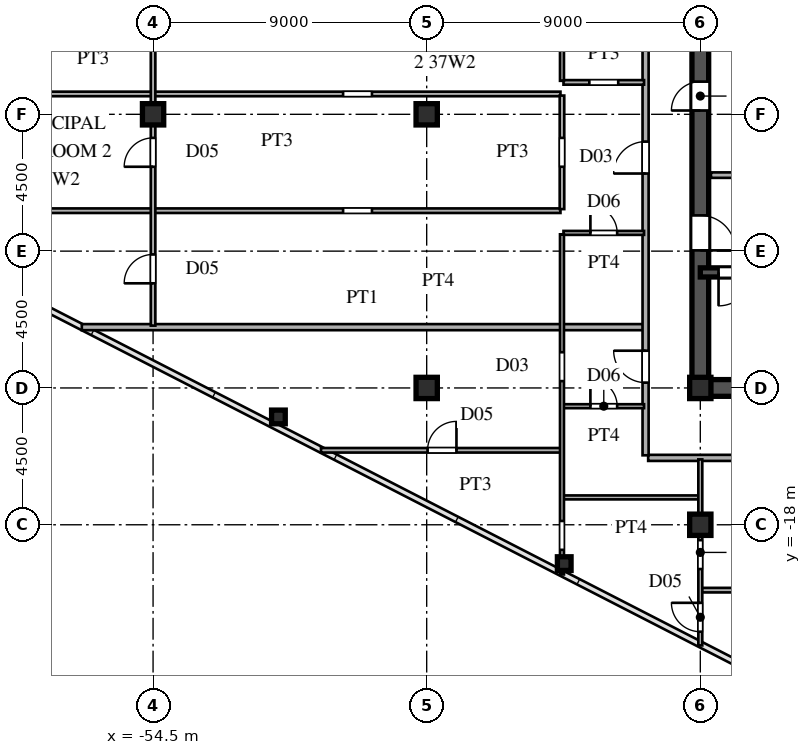
"""IFC4 building model, lengths in metres.
Left out: names, types, materials, properties, quantities, classifications, styles, units other than length and angle.
Written with IfcOpenShell. Run it as: python <this file> out.ifc"""

import sys

from ifc_helpers import new_model, si_unit, direction, frame, frame_2d, origin, origin_2d, place, context, subcontext, project, spatial, rectangle, hollow_rectangle, i_section, extrude, source, transform, mapped, element, fill, save


model = new_model("IFC4")
c1 = context("Model", 3, precision=1e-05, world=origin(), true_north=direction((0.0, 1.0)))
c2 = subcontext(c1, "Body", "Model", "MODEL_VIEW")
j1 = project(units=[si_unit("LENGTHUNIT", "METRE"), si_unit("PLANEANGLEUNIT", "RADIAN")], contexts=[c1])
p1 = place(None, origin())
s1 = spatial("IfcSite", under=j1, at=p1, CompositionType="ELEMENT")
p2 = place(p1, origin())
s2 = spatial("IfcBuilding", under=s1, at=p2, CompositionType="ELEMENT")
p3 = place(p2, frame((0.0, 0.0, 140.4)))
s3 = spatial("IfcBuildingStorey", under=s2, at=p3, CompositionType="ELEMENT", Elevation=140.4)
m1 = source(origin(), c2, "Body", "SweptSolid", [
    extrude(i_section(OverallWidth=0.7, OverallDepth=0.7, WebThickness=0.028, FlangeThickness=0.045, at=origin_2d()), origin(), (0.0, 0.0, 1.0), 3.6),
])
for number, where, z_axis, x_axis in (
    (1, (-36.5, -18.0, 0.0), (0.0, 0.0, 1.0), (1.0, 0.0, 0.0)),
    (2, (-36.5, -13.5, 0.0), (0.0, 0.0, 1.0), (1.0, 0.0, 0.0)),
    (3, (-45.5, -13.5, 0.0), (0.0, 0.0, 1.0), (1.0, 0.0, 0.0)),
    (4, (-45.5, -4.5, 0.0), (0.0, 0.0, 1.0), (1.0, 0.0, 0.0)),
    (5, (-54.5, -4.5, 0.0), (0.0, 0.0, 1.0), (1.0, 0.0, 0.0)),
):
    element("IfcColumn", number, at=place(p3, frame(where, z_axis=z_axis, x_axis=x_axis)), inside=s3, PredefinedType="COLUMN", context=c2, shape_type="MappedRepresentation", body=[
        mapped(m1, transform((0.0, 0.0, 0.0), scale=1.0)),
    ])
m2 = source(origin(), c2, "Body", "SweptSolid", [
    extrude(hollow_rectangle(XDim=0.45, YDim=0.45, WallThickness=0.018, at=origin_2d()), origin(), (0.0, 0.0, 1.0), 3.6),
])
for number, where, z_axis, x_axis in (
    (6, (-40.976, -19.278, 0.0), (0.0, 0.0, 1.0), (1.0, 0.0, 0.0)),
    (7, (-50.377, -14.453, 0.0), (0.0, 0.0, 1.0), (1.0, 0.0, 0.0)),
):
    element("IfcColumn", number, at=place(p3, frame(where, z_axis=z_axis, x_axis=x_axis)), inside=s3, PredefinedType="COLUMN", context=c2, shape_type="MappedRepresentation", body=[
        mapped(m2, transform((0.0, 0.0, 0.0), scale=1.0)),
    ])
p4 = place(p3, frame((-36.5, -13.5, 0.0), z_axis=(0.0, 0.0, 1.0), x_axis=(1.0, 0.0, 0.0)))
e8 = element("IfcWall", 8, at=p4, inside=s3, PredefinedType="SHEAR", context=c2, shape_type="SweptSolid", body=[
    extrude(rectangle(XDim=9.0, YDim=0.55, at=frame_2d((4.5, 0.0))), origin(), (0.0, 0.0, 1.0), 3.38),
])
p5 = place(p3, frame((-36.5, -13.65, 0.0), z_axis=(0.0, 0.0, 1.0), x_axis=(0.0, 1.0, 0.0)))
e9 = element("IfcWall", 9, at=p5, inside=s3, PredefinedType="SHEAR", context=c2, shape_type="SweptSolid", body=[
    extrude(rectangle(XDim=7.15, YDim=0.55, at=frame_2d((3.575, 0.0))), origin(), (0.0, 0.0, 1.0), 3.38),
])
p6 = place(p5, frame((4.675, 0.0, 0.0)))
e10 = element("IfcOpeningElement", 10, at=p6, cuts=e9, PredefinedType="OPENING", context=c2, shape_type="SweptSolid", body=[
    extrude(rectangle(XDim=1.15, YDim=2.2, at=frame_2d((0.575, 1.1))), frame((0.0, 0.285, 0.0), z_axis=(0.0, -1.0, 0.0), x_axis=(1.0, 0.0, 0.0)), (0.0, 0.0, 1.0), 0.57),
])
p7 = place(p3, frame((-36.5, -6.5, 0.0), z_axis=(0.0, 0.0, 1.0), x_axis=(0.0, 1.0, 0.0)))
e11 = element("IfcWall", 11, at=p7, inside=s3, PredefinedType="SHEAR", context=c2, shape_type="SweptSolid", body=[
    extrude(rectangle(XDim=5.2, YDim=0.55, at=frame_2d((2.6, 0.0))), origin(), (0.0, 0.0, 1.0), 3.38),
])
p8 = place(p7, frame((2.125, 0.0, 0.0)))
e12 = element("IfcOpeningElement", 12, at=p8, cuts=e11, PredefinedType="OPENING", context=c2, shape_type="SweptSolid", body=[
    extrude(rectangle(XDim=0.95, YDim=2.15, at=frame_2d((0.475, 1.075))), frame((0.0, 0.285, 0.0), z_axis=(0.0, -1.0, 0.0), x_axis=(1.0, 0.0, 0.0)), (0.0, 0.0, 1.0), 0.57),
])
p9 = place(p3, frame((-36.5, -9.7, 0.0), z_axis=(0.0, 0.0, 1.0), x_axis=(1.0, 0.0, 0.0)))
e13 = element("IfcWall", 13, at=p9, inside=s3, PredefinedType="SHEAR", context=c2, shape_type="SweptSolid", body=[
    extrude(rectangle(XDim=9.0, YDim=0.3, at=frame_2d((4.5, 0.0))), origin(), (0.0, 0.0, 1.0), 3.38),
])
p10 = place(p9, frame((0.6, 0.0, 0.0)))
e14 = element("IfcOpeningElement", 14, at=p10, cuts=e13, PredefinedType="OPENING", context=c2, shape_type="SweptSolid", body=[
    extrude(rectangle(XDim=1.1, YDim=2.2, at=frame_2d((0.55, 1.1))), frame((0.0, 0.16, 0.0), z_axis=(0.0, -1.0, 0.0), x_axis=(1.0, 0.0, 0.0)), (0.0, 0.0, 1.0), 0.32),
])
p11 = place(p3, frame((-36.15, -6.5, 0.0), z_axis=(0.0, 0.0, 1.0), x_axis=(1.0, 0.0, 0.0)))
e15 = element("IfcWall", 15, at=p11, inside=s3, PredefinedType="PARTITIONING", context=c2, shape_type="SweptSolid", body=[
    extrude(rectangle(XDim=5.7, YDim=0.18, at=frame_2d((2.85, 0.0))), origin(), (0.0, 0.0, 1.0), 3.38),
])
p12 = place(p3, frame((-36.45, -20.15, 0.0), z_axis=(0.0, 0.0, 1.0), x_axis=(1.0, 0.0, 0.0)))
e16 = element("IfcWall", 16, at=p12, inside=s3, PredefinedType="PARTITIONING", context=c2, shape_type="SweptSolid", body=[
    extrude(rectangle(XDim=8.649, YDim=0.15, at=frame_2d((4.325, 0.0))), origin(), (0.0, 0.0, 1.0), 3.38),
])
p13 = place(p3, frame((-41.0, -17.1, 0.0), z_axis=(0.0, 0.0, 1.0), x_axis=(1.0, 0.0, 0.0)))
e17 = element("IfcWall", 17, at=p13, inside=s3, PredefinedType="PARTITIONING", context=c2, shape_type="SweptSolid", body=[
    extrude(rectangle(XDim=4.45, YDim=0.13, at=frame_2d((2.225, 0.0))), origin(), (0.0, 0.0, 1.0), 3.38),
])
p14 = place(p3, frame((-38.215, -15.8, 0.0), z_axis=(0.0, 0.0, 1.0), x_axis=(1.0, 0.0, 0.0)))
e18 = element("IfcWall", 18, at=p14, inside=s3, PredefinedType="PARTITIONING", context=c2, shape_type="SweptSolid", body=[
    extrude(rectangle(XDim=10.715, YDim=0.2, at=frame_2d((5.357, 0.0))), origin(), (0.0, 0.0, 1.0), 3.38),
])
p15 = place(p3, frame((-48.977, -15.55, 0.0), z_axis=(0.0, 0.0, 1.0), x_axis=(1.0, 0.0, 0.0)))
e19 = element("IfcWall", 19, at=p15, inside=s3, PredefinedType="PARTITIONING", context=c2, shape_type="SweptSolid", body=[
    extrude(rectangle(XDim=7.877, YDim=0.15, at=frame_2d((3.938, 0.0))), origin(), (0.0, 0.0, 1.0), 3.38),
])
p16 = place(p15, frame((3.506, 0.0, 0.0)))
e20 = element("IfcOpeningElement", 20, at=p16, cuts=e19, PredefinedType="OPENING", context=c2, shape_type="SweptSolid", body=[
    extrude(rectangle(XDim=0.95, YDim=2.15, at=frame_2d((0.475, 1.075))), frame((0.0, 0.085, 0.0), z_axis=(0.0, -1.0, 0.0), x_axis=(1.0, 0.0, 0.0)), (0.0, 0.0, 1.0), 0.17),
])
p17 = place(p3, frame((-41.0, -14.1, 0.0), z_axis=(0.0, 0.0, 1.0), x_axis=(1.0, 0.0, 0.0)))
e21 = element("IfcWall", 21, at=p17, inside=s3, PredefinedType="PARTITIONING", context=c2, shape_type="SweptSolid", body=[
    extrude(rectangle(XDim=2.65, YDim=0.13, at=frame_2d((1.325, 0.0))), origin(), (0.0, 0.0, 1.0), 3.38),
])
p18 = place(p17, frame((0.885, 0.0, 0.0)))
e22 = element("IfcOpeningElement", 22, at=p18, cuts=e21, PredefinedType="OPENING", context=c2, shape_type="SweptSolid", body=[
    extrude(rectangle(XDim=0.88, YDim=2.1, at=frame_2d((0.44, 1.05))), frame((0.0, 0.075, 0.0), z_axis=(0.0, -1.0, 0.0), x_axis=(1.0, 0.0, 0.0)), (0.0, 0.0, 1.0), 0.15),
])
p19 = place(p3, frame((-56.844, -11.5, 0.0), z_axis=(0.0, 0.0, 1.0), x_axis=(1.0, 0.0, 0.0)))
e23 = element("IfcWall", 23, at=p19, inside=s3, PredefinedType="PARTITIONING", context=c2, shape_type="SweptSolid", body=[
    extrude(rectangle(XDim=18.464, YDim=0.2, at=frame_2d((9.232, 0.0))), origin(), (0.0, 0.0, 1.0), 3.38),
])
p20 = place(p3, frame((-41.0, -8.4, 0.0), z_axis=(0.0, 0.0, 1.0), x_axis=(1.0, 0.0, 0.0)))
e24 = element("IfcWall", 24, at=p20, inside=s3, PredefinedType="PARTITIONING", context=c2, shape_type="SweptSolid", body=[
    extrude(rectangle(XDim=2.65, YDim=0.13, at=frame_2d((1.325, 0.0))), origin(), (0.0, 0.0, 1.0), 3.38),
])
p21 = place(p20, frame((0.885, 0.0, 0.0)))
e25 = element("IfcOpeningElement", 25, at=p21, cuts=e24, PredefinedType="OPENING", context=c2, shape_type="SweptSolid", body=[
    extrude(rectangle(XDim=0.88, YDim=2.1, at=frame_2d((0.44, 1.05))), frame((0.0, 0.075, 0.0), z_axis=(0.0, -1.0, 0.0), x_axis=(1.0, 0.0, 0.0)), (0.0, 0.0, 1.0), 0.15),
])
p22 = place(p3, frame((-64.338, -7.67, 0.0), z_axis=(0.0, 0.0, 1.0), x_axis=(1.0, 0.0, 0.0)))
e26 = element("IfcWall", 26, at=p22, inside=s3, PredefinedType="PARTITIONING", context=c2, shape_type="SweptSolid", body=[
    extrude(rectangle(XDim=23.238, YDim=0.15, at=frame_2d((11.619, 0.0))), origin(), (0.0, 0.0, 1.0), 3.38),
])
p23 = place(p22, frame((16.088, 0.0, 0.0)))
e27 = element("IfcOpeningElement", 27, at=p23, cuts=e26, PredefinedType="OPENING", context=c2, shape_type="SweptSolid", body=[
    extrude(rectangle(XDim=0.95, YDim=2.15, at=frame_2d((0.475, 1.075))), frame((0.0, 0.085, 0.0), z_axis=(0.0, -1.0, 0.0), x_axis=(1.0, 0.0, 0.0)), (0.0, 0.0, 1.0), 0.17),
])
p24 = place(p3, frame((-69.535, -3.83, 0.0), z_axis=(0.0, 0.0, 1.0), x_axis=(1.0, 0.0, 0.0)))
e28 = element("IfcWall", 28, at=p24, inside=s3, PredefinedType="PARTITIONING", context=c2, shape_type="SweptSolid", body=[
    extrude(rectangle(XDim=28.435, YDim=0.15, at=frame_2d((14.217, 0.0))), origin(), (0.0, 0.0, 1.0), 3.38),
])
p25 = place(p24, frame((21.285, 0.0, 0.0)))
e29 = element("IfcOpeningElement", 29, at=p25, cuts=e28, PredefinedType="OPENING", context=c2, shape_type="SweptSolid", body=[
    extrude(rectangle(XDim=0.95, YDim=2.15, at=frame_2d((0.475, 1.075))), frame((0.0, 0.085, 0.0), z_axis=(0.0, -1.0, 0.0), x_axis=(1.0, 0.0, 0.0)), (0.0, 0.0, 1.0), 0.17),
])
p26 = place(p3, frame((-41.0, -3.45, 0.0), z_axis=(0.0, 0.0, 1.0), x_axis=(1.0, 0.0, 0.0)))
e30 = element("IfcWall", 30, at=p26, inside=s3, PredefinedType="PARTITIONING", context=c2, shape_type="SweptSolid", body=[
    extrude(rectangle(XDim=2.65, YDim=0.15, at=frame_2d((1.325, 0.0))), origin(), (0.0, 0.0, 1.0), 3.38),
])
p27 = place(p26, frame((0.85, 0.0, 0.0)))
e31 = element("IfcOpeningElement", 31, at=p27, cuts=e30, PredefinedType="OPENING", context=c2, shape_type="SweptSolid", body=[
    extrude(rectangle(XDim=0.95, YDim=2.15, at=frame_2d((0.475, 1.075))), frame((0.0, 0.085, 0.0), z_axis=(0.0, -1.0, 0.0), x_axis=(1.0, 0.0, 0.0)), (0.0, 0.0, 1.0), 0.17),
])
p28 = place(p3, frame((-54.5, -11.45, 0.0), z_axis=(0.0, 0.0, 1.0), x_axis=(0.0, 1.0, 0.0)))
e32 = element("IfcWall", 32, at=p28, inside=s3, PredefinedType="PARTITIONING", context=c2, shape_type="SweptSolid", body=[
    extrude(rectangle(XDim=21.4, YDim=0.15, at=frame_2d((10.7, 0.0))), origin(), (0.0, 0.0, 1.0), 2.78),
])
p29 = place(p28, frame((5.225, 0.0, 0.0)))
e33 = element("IfcOpeningElement", 33, at=p29, cuts=e32, PredefinedType="OPENING", context=c2, shape_type="SweptSolid", body=[
    extrude(rectangle(XDim=0.95, YDim=2.15, at=frame_2d((0.475, 1.075))), frame((0.0, 0.085, 0.0), z_axis=(0.0, -1.0, 0.0), x_axis=(1.0, 0.0, 0.0)), (0.0, 0.0, 1.0), 0.17),
])
p30 = place(p28, frame((1.392, 0.0, 0.0)))
e34 = element("IfcOpeningElement", 34, at=p30, cuts=e32, PredefinedType="OPENING", context=c2, shape_type="SweptSolid", body=[
    extrude(rectangle(XDim=0.95, YDim=2.15, at=frame_2d((0.475, 1.075))), frame((0.0, 0.085, 0.0), z_axis=(0.0, -1.0, 0.0), x_axis=(1.0, 0.0, 0.0)), (0.0, 0.0, 1.0), 0.17),
])
p31 = place(p28, frame((9.058, 0.0, 0.0)))
e35 = element("IfcOpeningElement", 35, at=p31, cuts=e32, PredefinedType="OPENING", context=c2, shape_type="SweptSolid", body=[
    extrude(rectangle(XDim=0.95, YDim=2.15, at=frame_2d((0.475, 1.075))), frame((0.0, 0.085, 0.0), z_axis=(0.0, -1.0, 0.0), x_axis=(1.0, 0.0, 0.0)), (0.0, 0.0, 1.0), 0.17),
])
p32 = place(p28, frame((13.475, 0.0, 0.0)))
e36 = element("IfcOpeningElement", 36, at=p32, cuts=e32, PredefinedType="OPENING", context=c2, shape_type="SweptSolid", body=[
    extrude(rectangle(XDim=0.95, YDim=2.15, at=frame_2d((0.475, 1.075))), frame((0.0, 0.085, 0.0), z_axis=(0.0, -1.0, 0.0), x_axis=(1.0, 0.0, 0.0)), (0.0, 0.0, 1.0), 0.17),
])
p33 = place(p3, frame((-41.05, -19.634, 0.0), z_axis=(0.0, 0.0, 1.0), x_axis=(0.0, 1.0, 0.0)))
e37 = element("IfcWall", 37, at=p33, inside=s3, PredefinedType="PARTITIONING", context=c2, shape_type="SweptSolid", body=[
    extrude(rectangle(XDim=11.187, YDim=0.13, at=frame_2d((5.594, 0.0))), origin(), (0.0, 0.0, 1.0), 2.99),
])
p34 = place(p33, frame((6.359, 0.0, 0.0)))
e38 = element("IfcOpeningElement", 38, at=p34, cuts=e37, PredefinedType="OPENING", context=c2, shape_type="SweptSolid", body=[
    extrude(rectangle(XDim=0.95, YDim=2.15, at=frame_2d((0.475, 1.075))), frame((0.0, 0.075, 0.0), z_axis=(0.0, -1.0, 0.0), x_axis=(1.0, 0.0, 0.0)), (0.0, 0.0, 1.0), 0.15),
])
p35 = place(p33, frame((0.809, 0.0, 0.0)))
e39 = element("IfcOpeningElement", 39, at=p35, cuts=e37, PredefinedType="OPENING", context=c2, shape_type="SweptSolid", body=[
    extrude(rectangle(XDim=0.95, YDim=2.15, at=frame_2d((0.475, 1.075))), frame((0.0, 0.075, 0.0), z_axis=(0.0, -1.0, 0.0), x_axis=(1.0, 0.0, 0.0)), (0.0, 0.0, 1.0), 0.15),
])
p36 = place(p3, frame((-41.05, -7.617, 0.0), z_axis=(0.0, 0.0, 1.0), x_axis=(0.0, 1.0, 0.0)))
e40 = element("IfcWall", 40, at=p36, inside=s3, PredefinedType="PARTITIONING", context=c2, shape_type="SweptSolid", body=[
    extrude(rectangle(XDim=3.734, YDim=0.15, at=frame_2d((1.867, 0.0))), origin(), (0.0, 0.0, 1.0), 2.99),
])
p37 = place(p36, frame((1.392, 0.0, 0.0)))
e41 = element("IfcOpeningElement", 41, at=p37, cuts=e40, PredefinedType="OPENING", context=c2, shape_type="SweptSolid", body=[
    extrude(rectangle(XDim=0.95, YDim=2.15, at=frame_2d((0.475, 1.075))), frame((0.0, 0.085, 0.0), z_axis=(0.0, -1.0, 0.0), x_axis=(1.0, 0.0, 0.0)), (0.0, 0.0, 1.0), 0.17),
])
p38 = place(p3, frame((-41.05, -3.398, 0.0), z_axis=(0.0, 0.0, 1.0), x_axis=(0.0, 1.0, 0.0)))
e42 = element("IfcWall", 42, at=p38, inside=s3, PredefinedType="PARTITIONING", context=c2, shape_type="SweptSolid", body=[
    extrude(rectangle(XDim=23.032, YDim=0.13, at=frame_2d((11.516, 0.0))), origin(), (0.0, 0.0, 1.0), 2.99),
])
p39 = place(p38, frame((6.772, 0.0, 0.0)))
e43 = element("IfcOpeningElement", 43, at=p39, cuts=e42, PredefinedType="OPENING", context=c2, shape_type="SweptSolid", body=[
    extrude(rectangle(XDim=0.95, YDim=2.15, at=frame_2d((0.475, 1.075))), frame((0.0, 0.075, 0.0), z_axis=(0.0, -1.0, 0.0), x_axis=(1.0, 0.0, 0.0)), (0.0, 0.0, 1.0), 0.15),
])
p40 = place(p38, frame((8.924, 0.0, 0.0)))
e44 = element("IfcOpeningElement", 44, at=p40, cuts=e42, PredefinedType="OPENING", context=c2, shape_type="SweptSolid", body=[
    extrude(rectangle(XDim=0.95, YDim=2.15, at=frame_2d((0.475, 1.075))), frame((0.0, 0.075, 0.0), z_axis=(0.0, -1.0, 0.0), x_axis=(1.0, 0.0, 0.0)), (0.0, 0.0, 1.0), 0.15),
])
p41 = place(p38, frame((14.321, 0.0, 0.0)))
e45 = element("IfcOpeningElement", 45, at=p41, cuts=e42, PredefinedType="OPENING", context=c2, shape_type="SweptSolid", body=[
    extrude(rectangle(XDim=0.95, YDim=2.15, at=frame_2d((0.475, 1.075))), frame((0.0, 0.075, 0.0), z_axis=(0.0, -1.0, 0.0), x_axis=(1.0, 0.0, 0.0)), (0.0, 0.0, 1.0), 0.15),
])
p42 = place(p38, frame((21.273, 0.0, 0.0)))
e46 = element("IfcOpeningElement", 46, at=p42, cuts=e42, PredefinedType="OPENING", context=c2, shape_type="SweptSolid", body=[
    extrude(rectangle(XDim=0.95, YDim=2.15, at=frame_2d((0.475, 1.075))), frame((0.0, 0.075, 0.0), z_axis=(0.0, -1.0, 0.0), x_axis=(1.0, 0.0, 0.0)), (0.0, 0.0, 1.0), 0.15),
])
p43 = place(p3, frame((-38.3, -15.715, 0.0), z_axis=(0.0, 0.0, 1.0), x_axis=(0.0, 1.0, 0.0)))
e47 = element("IfcWall", 47, at=p43, inside=s3, PredefinedType="PARTITIONING", context=c2, shape_type="SweptSolid", body=[
    extrude(rectangle(XDim=31.43, YDim=0.2, at=frame_2d((15.715, 0.0))), origin(), (0.0, 0.0, 1.0), 3.38),
])
p44 = place(p43, frame((2.39, 0.0, 0.0)))
e48 = element("IfcOpeningElement", 48, at=p44, cuts=e47, PredefinedType="OPENING", context=c2, shape_type="SweptSolid", body=[
    extrude(rectangle(XDim=1.05, YDim=2.25, at=frame_2d((0.525, 1.125))), frame((0.0, 0.11, 0.0), z_axis=(0.0, -1.0, 0.0), x_axis=(1.0, 0.0, 0.0)), (0.0, 0.0, 1.0), 0.22),
])
p45 = place(p43, frame((9.268, 0.0, 0.0)))
e49 = element("IfcOpeningElement", 49, at=p45, cuts=e47, PredefinedType="OPENING", context=c2, shape_type="SweptSolid", body=[
    extrude(rectangle(XDim=1.05, YDim=2.25, at=frame_2d((0.525, 1.125))), frame((0.0, 0.11, 0.0), z_axis=(0.0, -1.0, 0.0), x_axis=(1.0, 0.0, 0.0)), (0.0, 0.0, 1.0), 0.22),
])
p46 = place(p43, frame((20.04, 0.0, 0.0)))
e50 = element("IfcOpeningElement", 50, at=p46, cuts=e47, PredefinedType="OPENING", context=c2, shape_type="SweptSolid", body=[
    extrude(rectangle(XDim=1.05, YDim=2.25, at=frame_2d((0.525, 1.125))), frame((0.0, 0.11, 0.0), z_axis=(0.0, -1.0, 0.0), x_axis=(1.0, 0.0, 0.0)), (0.0, 0.0, 1.0), 0.22),
])
p47 = place(p43, frame((26.587, 0.0, 0.0)))
e51 = element("IfcOpeningElement", 51, at=p47, cuts=e47, PredefinedType="OPENING", context=c2, shape_type="SweptSolid", body=[
    extrude(rectangle(XDim=1.05, YDim=2.25, at=frame_2d((0.525, 1.125))), frame((0.0, 0.11, 0.0), z_axis=(0.0, -1.0, 0.0), x_axis=(1.0, 0.0, 0.0)), (0.0, 0.0, 1.0), 0.22),
])
p48 = place(p3, frame((-36.5, -21.969, 0.0), z_axis=(0.0, 0.0, 1.0), x_axis=(0.0, 1.0, 0.0)))
e52 = element("IfcWall", 52, at=p48, inside=s3, PredefinedType="PARTITIONING", context=c2, shape_type="SweptSolid", body=[
    extrude(rectangle(XDim=6.119, YDim=0.13, at=frame_2d((3.06, 0.0))), origin(), (0.0, 0.0, 1.0), 2.78),
])
p49 = place(p48, frame((0.452, 0.0, 0.0)))
e53 = element("IfcOpeningElement", 53, at=p49, cuts=e52, PredefinedType="OPENING", context=c2, shape_type="SweptSolid", body=[
    extrude(rectangle(XDim=0.95, YDim=2.15, at=frame_2d((0.475, 1.075))), frame((0.0, 0.075, 0.0), z_axis=(0.0, -1.0, 0.0), x_axis=(1.0, 0.0, 0.0)), (0.0, 0.0, 1.0), 0.15),
])
p50 = place(p48, frame((2.513, 0.0, 0.0)))
e54 = element("IfcOpeningElement", 54, at=p50, cuts=e52, PredefinedType="OPENING", context=c2, shape_type="SweptSolid", body=[
    extrude(rectangle(XDim=0.95, YDim=2.15, at=frame_2d((0.475, 1.075))), frame((0.0, 0.075, 0.0), z_axis=(0.0, -1.0, 0.0), x_axis=(1.0, 0.0, 0.0)), (0.0, 0.0, 1.0), 0.15),
])
m3 = source(origin(), c2, "Body", "SweptSolid", [
    extrude(rectangle(XDim=1.15, YDim=2.2, at=frame_2d((0.575, 1.1))), frame((0.0, 0.025, 0.0), z_axis=(0.0, -1.0, 0.0), x_axis=(1.0, 0.0, 0.0)), (0.0, 0.0, 1.0), 0.05),
])
p51 = place(p6, frame((1.15, 0.0, 0.0), z_axis=(0.0, 0.0, 1.0), x_axis=(-1.0, 0.0, 0.0)))
e55 = element("IfcDoor", 55, at=p51, inside=s3, OperationType="SINGLE_SWING_LEFT", PredefinedType="DOOR", context=c2, shape_type="MappedRepresentation", body=[
    mapped(m3, transform((0.0, 0.0, 0.0), scale=1.0)),
])
fill(e10, e55)
m4 = source(origin(), c2, "Body", "SweptSolid", [
    extrude(rectangle(XDim=0.95, YDim=2.15, at=frame_2d((0.475, 1.075))), frame((0.0, 0.025, 0.0), z_axis=(0.0, -1.0, 0.0), x_axis=(1.0, 0.0, 0.0)), (0.0, 0.0, 1.0), 0.05),
])
p52 = place(p8, origin())
e56 = element("IfcDoor", 56, at=p52, inside=s3, OperationType="SINGLE_SWING_LEFT", PredefinedType="DOOR", context=c2, shape_type="MappedRepresentation", body=[
    mapped(m4, transform((0.0, 0.0, 0.0), scale=1.0)),
])
fill(e12, e56)
m5 = source(origin(), c2, "Body", "SweptSolid", [
    extrude(rectangle(XDim=1.1, YDim=2.2, at=frame_2d((0.55, 1.1))), frame((0.0, 0.025, 0.0), z_axis=(0.0, -1.0, 0.0), x_axis=(1.0, 0.0, 0.0)), (0.0, 0.0, 1.0), 0.05),
])
p53 = place(p10, frame((1.1, 0.0, 0.0), z_axis=(0.0, 0.0, 1.0), x_axis=(-1.0, 0.0, 0.0)))
e57 = element("IfcDoor", 57, at=p53, inside=s3, OperationType="SINGLE_SWING_LEFT", PredefinedType="DOOR", context=c2, shape_type="MappedRepresentation", body=[
    mapped(m5, transform((0.0, 0.0, 0.0), scale=1.0)),
])
fill(e14, e57)
m6 = source(origin(), c2, "Body", "SweptSolid", [
    extrude(rectangle(XDim=0.95, YDim=2.15, at=frame_2d((0.475, 1.075))), frame((0.0, 0.025, 0.0), z_axis=(0.0, -1.0, 0.0), x_axis=(1.0, 0.0, 0.0)), (0.0, 0.0, 1.0), 0.05),
])
p54 = place(p16, origin())
e58 = element("IfcDoor", 58, at=p54, inside=s3, OperationType="SINGLE_SWING_RIGHT", PredefinedType="DOOR", context=c2, shape_type="MappedRepresentation", body=[
    mapped(m6, transform((0.0, 0.0, 0.0), scale=1.0)),
])
fill(e20, e58)
m7 = source(origin(), c2, "Body", "SweptSolid", [
    extrude(rectangle(XDim=0.88, YDim=2.1, at=frame_2d((0.44, 1.05))), frame((0.0, 0.025, 0.0), z_axis=(0.0, -1.0, 0.0), x_axis=(1.0, 0.0, 0.0)), (0.0, 0.0, 1.0), 0.05),
])
p55 = place(p18, origin())
e59 = element("IfcDoor", 59, at=p55, inside=s3, OperationType="SINGLE_SWING_LEFT", PredefinedType="DOOR", context=c2, shape_type="MappedRepresentation", body=[
    mapped(m7, transform((0.0, 0.0, 0.0), scale=1.0)),
])
fill(e22, e59)
p56 = place(p21, origin())
e60 = element("IfcDoor", 60, at=p56, inside=s3, OperationType="SINGLE_SWING_LEFT", PredefinedType="DOOR", context=c2, shape_type="MappedRepresentation", body=[
    mapped(m7, transform((0.0, 0.0, 0.0), scale=1.0)),
])
fill(e25, e60)
p57 = place(p29, origin())
e61 = element("IfcDoor", 61, at=p57, inside=s3, OperationType="SINGLE_SWING_LEFT", PredefinedType="DOOR", context=c2, shape_type="MappedRepresentation", body=[
    mapped(m6, transform((0.0, 0.0, 0.0), scale=1.0)),
])
fill(e33, e61)
p58 = place(p30, origin())
e62 = element("IfcDoor", 62, at=p58, inside=s3, OperationType="SINGLE_SWING_LEFT", PredefinedType="DOOR", context=c2, shape_type="MappedRepresentation", body=[
    mapped(m6, transform((0.0, 0.0, 0.0), scale=1.0)),
])
fill(e34, e62)
m8 = source(origin(), c2, "Body", "SweptSolid", [
    extrude(rectangle(XDim=1.05, YDim=2.25, at=frame_2d((0.525, 1.125))), frame((0.0, 0.025, 0.0), z_axis=(0.0, -1.0, 0.0), x_axis=(1.0, 0.0, 0.0)), (0.0, 0.0, 1.0), 0.05),
])
p59 = place(p44, origin())
e63 = element("IfcDoor", 63, at=p59, inside=s3, OperationType="SINGLE_SWING_RIGHT", PredefinedType="DOOR", context=c2, shape_type="MappedRepresentation", body=[
    mapped(m8, transform((0.0, 0.0, 0.0), scale=1.0)),
])
fill(e48, e63)
p60 = place(p45, origin())
e64 = element("IfcDoor", 64, at=p60, inside=s3, OperationType="SINGLE_SWING_LEFT", PredefinedType="DOOR", context=c2, shape_type="MappedRepresentation", body=[
    mapped(m8, transform((0.0, 0.0, 0.0), scale=1.0)),
])
fill(e49, e64)
p61 = place(p49, origin())
e65 = element("IfcDoor", 65, at=p61, inside=s3, OperationType="SINGLE_SWING_RIGHT", PredefinedType="DOOR", context=c2, shape_type="MappedRepresentation", body=[
    mapped(m6, transform((0.0, 0.0, 0.0), scale=1.0)),
])
fill(e53, e65)
save(model, sys.argv[1])
